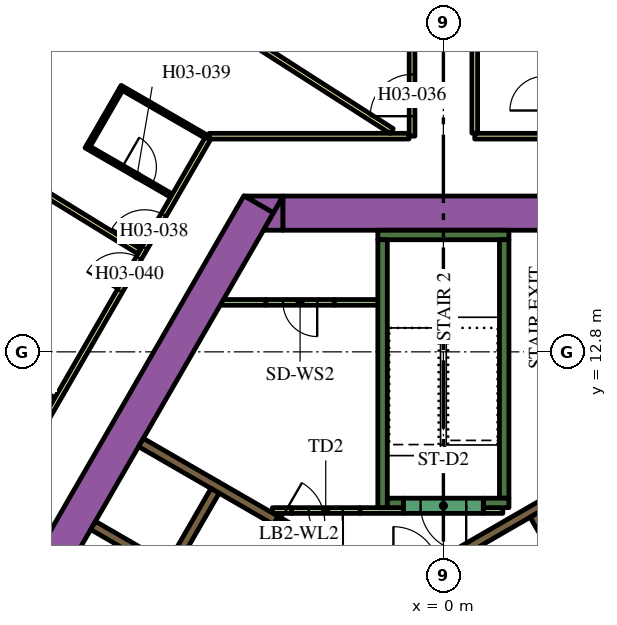
"""IFC4 building model, lengths in metres.
Left out: names, types, materials, properties, quantities, classifications, styles, units other than length and angle.
Written with IfcOpenShell. Run it as: python <this file> out.ifc"""

import sys

from ifc_helpers import new_model, si_unit, direction, frame, frame_2d, origin, place, context, subcontext, project, spatial, polyline, rectangle, outline, extrude, element, fill, save


model = new_model("IFC4")
c1 = context("Model", 3, precision=1e-05, world=origin(), true_north=direction((0.0, 1.0)))
c2 = subcontext(c1, "Body", "Model", "MODEL_VIEW")
j1 = project(units=[si_unit("LENGTHUNIT", "METRE"), si_unit("PLANEANGLEUNIT", "RADIAN")], contexts=[c1])
p1 = place(None, origin())
s1 = spatial("IfcSite", under=j1, at=p1, CompositionType="ELEMENT")
p2 = place(p1, origin())
s2 = spatial("IfcBuilding", under=s1, at=p2, CompositionType="ELEMENT")
p3 = place(p2, frame((0.0, 0.0, 58.8)))
s3 = spatial("IfcBuildingStorey", under=s2, at=p3, CompositionType="ELEMENT", Elevation=58.8)
p4 = place(p3, frame((-14.268, 0.387, 0.0), z_axis=(0.0, 0.0, 1.0), x_axis=(0.499994617707, 0.866028511231, 0.0)))
e1 = element("IfcWall", 1, at=p4, inside=s3, PredefinedType="SOLIDWALL", context=c2, shape_type="SweptSolid", body=[
    extrude(rectangle(XDim=18.817, YDim=0.9, at=frame_2d((9.409, 0.0))), origin(), (0.0, 0.0, 1.0), 3.9),
])
p5 = place(p3, origin())
e2 = element("IfcWall", 2, at=p5, inside=s3, PredefinedType="SOLIDWALL", context=c2, shape_type="SweptSolid", body=[
    extrude(outline(polyline([(-4.215, 16.9), (-4.469, 16.46), (-5.231, 16.9), (-4.215, 16.9)])), origin(), (0.0, 0.0, 1.0), 3.9),
])
p6 = place(p3, frame((-4.224, 16.45, 0.0), z_axis=(0.0, 0.0, 1.0), x_axis=(1.0, 0.0, 0.0)))
e3 = element("IfcWall", 3, at=p6, inside=s3, PredefinedType="SOLIDWALL", context=c2, shape_type="SweptSolid", body=[
    extrude(rectangle(XDim=9.488, YDim=0.9, at=frame_2d((4.744, 0.0))), origin(), (0.0, 0.0, 1.0), 3.9),
])
e4 = element("IfcWall", 4, at=p5, inside=s3, PredefinedType="SOLIDWALL", context=c2, shape_type="SweptSolid", body=[
    extrude(outline(polyline([(-4.734, 16.0), (-4.226, 16.88), (-4.226, 16.0), (-4.734, 16.0)])), origin(), (0.0, 0.0, 1.0), 3.9),
])
p7 = place(p3, frame((-1.725, 15.875, 0.0), z_axis=(0.0, 0.0, 1.0), x_axis=(1.0, 0.0, 0.0)))
e5 = element("IfcWall", 5, at=p7, inside=s3, PredefinedType="SOLIDWALL", context=c2, shape_type="SweptSolid", body=[
    extrude(rectangle(XDim=3.45, YDim=0.25, at=frame_2d((1.725, 0.0))), origin(), (0.0, 0.0, 1.0), 3.9),
])
p8 = place(p3, frame((1.6, 8.95, 0.0), z_axis=(0.0, 0.0, 1.0), x_axis=(0.0, 1.0, 0.0)))
e6 = element("IfcWall", 6, at=p8, inside=s3, PredefinedType="SOLIDWALL", context=c2, shape_type="SweptSolid", body=[
    extrude(rectangle(XDim=6.8, YDim=0.25, at=frame_2d((3.4, 0.0))), origin(), (0.0, 0.0, 1.0), 3.9),
])
p9 = place(p3, frame((1.05, 8.825, 0.0), z_axis=(0.0, 0.0, 1.0), x_axis=(1.0, 0.0, 0.0)))
e7 = element("IfcWall", 7, at=p9, inside=s3, PredefinedType="SOLIDWALL", context=c2, shape_type="SweptSolid", body=[
    extrude(rectangle(XDim=0.675, YDim=0.25, at=frame_2d((0.337, 0.0))), origin(), (0.0, 0.0, 1.0), 3.9),
])
p10 = place(p3, frame((-1.6, 8.7, 0.0), z_axis=(0.0, 0.0, 1.0), x_axis=(0.0, 1.0, 0.0)))
e8 = element("IfcWall", 8, at=p10, inside=s3, PredefinedType="SOLIDWALL", context=c2, shape_type="SweptSolid", body=[
    extrude(rectangle(XDim=7.05, YDim=0.25, at=frame_2d((3.525, 0.0))), origin(), (0.0, 0.0, 1.0), 3.9),
])
p11 = place(p3, frame((-1.475, 8.825, 0.0), z_axis=(0.0, 0.0, 1.0), x_axis=(1.0, 0.0, 0.0)))
e9 = element("IfcWall", 9, at=p11, inside=s3, PredefinedType="SOLIDWALL", context=c2, shape_type="SweptSolid", body=[
    extrude(rectangle(XDim=0.425, YDim=0.25, at=frame_2d((0.212, 0.0))), origin(), (0.0, 0.0, 1.0), 3.9),
])
p12 = place(p3, frame((0.314, 7.456, 0.0), z_axis=(0.0, 0.0, 1.0), x_axis=(0.866013897511, 0.50001992892, 0.0)))
e10 = element("IfcWall", 10, at=p12, inside=s3, PredefinedType="SOLIDWALL", context=c2, shape_type="SweptSolid", body=[
    extrude(rectangle(XDim=3.268, YDim=0.25, at=frame_2d((1.634, 0.0))), origin(), (0.0, 0.0, 1.0), 3.9),
])
e11 = element("IfcWall", 11, at=p5, inside=s3, PredefinedType="SOLIDWALL", context=c2, shape_type="SweptSolid", body=[
    extrude(outline(polyline([(-3.128, 7.481), (-3.259, 7.557), (-3.134, 7.773), (-3.003, 7.698), (-3.128, 7.481)])), origin(), (0.0, 0.0, 1.0), 3.9),
])
p13 = place(p3, frame((-7.314, 7.132, 0.0), z_axis=(0.0, 0.0, 1.0), x_axis=(-0.866008176907, 0.50002983664, 0.0)))
e12 = element("IfcWall", 12, at=p13, inside=s3, PredefinedType="SOLIDWALL", context=c2, shape_type="SweptSolid", body=[
    extrude(rectangle(XDim=2.2, YDim=0.25, at=frame_2d((1.1, 0.0))), origin(), (0.0, 0.0, 1.0), 3.9),
])
p14 = place(p3, frame((-7.959, 10.415, 0.0), z_axis=(0.0, 0.0, 1.0), x_axis=(0.866020958405, -0.500007699544, 0.0)))
e13 = element("IfcWall", 13, at=p14, inside=s3, PredefinedType="SOLIDWALL", context=c2, shape_type="SweptSolid", body=[
    extrude(rectangle(XDim=4.1, YDim=0.25, at=frame_2d((2.05, 0.0))), origin(), (0.0, 0.0, 1.0), 3.9),
])
p15 = place(p3, frame((-3.997, 8.625, 0.0), z_axis=(0.0, 0.0, 1.0), x_axis=(-1.0, 0.0, 0.0)))
e14 = element("IfcWall", 14, at=p15, inside=s3, PredefinedType="PARTITIONING", context=c2, shape_type="SweptSolid", body=[
    extrude(rectangle(XDim=0.502, YDim=0.15, at=frame_2d((0.251, 0.0))), origin(), (0.0, 0.0, 1.0), 2.75),
])
p16 = place(p3, frame((-5.851, 14.102, 0.0), z_axis=(0.0, 0.0, 1.0), x_axis=(1.0, 0.0, 0.0)))
e15 = element("IfcWall", 15, at=p16, inside=s3, PredefinedType="PARTITIONING", context=c2, shape_type="SweptSolid", body=[
    extrude(rectangle(XDim=1.18, YDim=0.15, at=frame_2d((0.59, 0.0))), origin(), (0.0, 0.0, 1.0), 2.75),
])
p17 = place(p3, frame((-2.196, 8.625, 0.0), z_axis=(0.0, 0.0, 1.0), x_axis=(1.0, 0.0, 0.0)))
e16 = element("IfcWall", 16, at=p17, inside=s3, PredefinedType="PARTITIONING", context=c2, shape_type="SweptSolid", body=[
    extrude(rectangle(XDim=1.146, YDim=0.15, at=frame_2d((0.573, 0.0))), origin(), (0.0, 0.0, 1.0), 2.75),
])
p18 = place(p3, frame((1.05, 8.625, 0.0), z_axis=(0.0, 0.0, 1.0), x_axis=(1.0, 0.0, 0.0)))
e17 = element("IfcWall", 17, at=p18, inside=s3, PredefinedType="PARTITIONING", context=c2, shape_type="SweptSolid", body=[
    extrude(rectangle(XDim=0.514, YDim=0.15, at=frame_2d((0.257, 0.0))), origin(), (0.0, 0.0, 1.0), 2.75),
])
p19 = place(p3, frame((-2.871, 14.102, 0.0), z_axis=(0.0, 0.0, 1.0), x_axis=(1.0, 0.0, 0.0)))
e18 = element("IfcWall", 18, at=p19, inside=s3, PredefinedType="PARTITIONING", context=c2, shape_type="SweptSolid", body=[
    extrude(rectangle(XDim=1.196, YDim=0.15, at=frame_2d((0.598, 0.0))), origin(), (0.0, 0.0, 1.0), 2.75),
])
p20 = place(p3, frame((8.565, -2.185, 0.0), z_axis=(0.0, 0.0, 1.0), x_axis=(-0.499997954832, 0.866026584559, 0.0)))
e19 = element("IfcWall", 19, at=p20, inside=s3, PredefinedType="SOLIDWALL", context=c2, shape_type="SweptSolid", body=[
    extrude(rectangle(XDim=12.35, YDim=0.25, at=frame_2d((6.175, 0.0))), origin(), (0.0, 0.0, 1.0), 3.9),
])
p21 = place(p20, frame((5.725, 0.0, 0.0)))
e20 = element("IfcOpeningElement", 20, at=p21, cuts=e19, PredefinedType="OPENING", context=c2, shape_type="SweptSolid", body=[
    extrude(rectangle(XDim=0.9, YDim=2.1, at=frame_2d((0.45, 1.05))), frame((0.0, 0.135, 0.0), z_axis=(0.0, -1.0, 0.0), x_axis=(1.0, 0.0, 0.0)), (0.0, 0.0, 1.0), 0.27),
])
p22 = place(p3, frame((-6.008, 9.144, 0.0), z_axis=(0.0, 0.0, 1.0), x_axis=(-0.500006956611, -0.866021387346, 0.0)))
e21 = element("IfcWall", 21, at=p22, inside=s3, PredefinedType="SOLIDWALL", context=c2, shape_type="SweptSolid", body=[
    extrude(rectangle(XDim=9.83, YDim=0.25, at=frame_2d((4.915, 0.0))), origin(), (0.0, 0.0, 1.0), 3.9),
])
p23 = place(p22, frame((6.985, 0.0, 0.0)))
e22 = element("IfcOpeningElement", 22, at=p23, cuts=e21, PredefinedType="OPENING", context=c2, shape_type="SweptSolid", body=[
    extrude(rectangle(XDim=0.9, YDim=2.1, at=frame_2d((0.45, 1.05))), frame((0.0, 0.135, 0.0), z_axis=(0.0, -1.0, 0.0), x_axis=(1.0, 0.0, 0.0)), (0.0, 0.0, 1.0), 0.27),
])
p24 = place(p3, frame((1.05, 8.75, 0.0), z_axis=(0.0, 0.0, 1.0), x_axis=(-1.0, 0.0, 0.0)))
e23 = element("IfcWall", 23, at=p24, inside=s3, PredefinedType="SOLIDWALL", context=c2, shape_type="SweptSolid", body=[
    extrude(rectangle(XDim=2.1, YDim=0.4, at=frame_2d((1.05, 0.0))), origin(), (0.0, 0.0, 1.0), 3.9),
])
p25 = place(p24, frame((0.45, 0.0, 0.0)))
e24 = element("IfcOpeningElement", 24, at=p25, cuts=e23, PredefinedType="OPENING", context=c2, shape_type="SweptSolid", body=[
    extrude(rectangle(XDim=1.2, YDim=2.1, at=frame_2d((0.6, 1.05))), frame((0.0, 0.21, 0.0), z_axis=(0.0, -1.0, 0.0), x_axis=(1.0, 0.0, 0.0)), (0.0, 0.0, 1.0), 0.42),
])
p26 = place(p3, frame((-2.196, 8.625, 0.0), z_axis=(0.0, 0.0, 1.0), x_axis=(-1.0, 0.0, 0.0)))
e25 = element("IfcWall", 25, at=p26, inside=s3, PredefinedType="PARTITIONING", context=c2, shape_type="SweptSolid", body=[
    extrude(rectangle(XDim=1.8, YDim=0.15, at=frame_2d((0.9, 0.0))), origin(), (0.0, 0.0, 1.0), 2.75),
])
p27 = place(p26, frame((0.45, 0.0, 0.0)))
e26 = element("IfcOpeningElement", 26, at=p27, cuts=e25, PredefinedType="OPENING", context=c2, shape_type="SweptSolid", body=[
    extrude(rectangle(XDim=0.9, YDim=2.1, at=frame_2d((0.45, 1.05))), frame((0.0, 0.085, 0.0), z_axis=(0.0, -1.0, 0.0), x_axis=(1.0, 0.0, 0.0)), (0.0, 0.0, 1.0), 0.17),
])
p28 = place(p3, frame((-4.409, 8.365, 0.0), z_axis=(0.0, 0.0, 1.0), x_axis=(0.866034573852, -0.49998411664, 0.0)))
e27 = element("IfcWall", 27, at=p28, inside=s3, PredefinedType="SOLIDWALL", context=c2, shape_type="SweptSolid", body=[
    extrude(rectangle(XDim=1.4, YDim=0.25, at=frame_2d((0.7, 0.0))), origin(), (0.0, 0.0, 1.0), 3.9),
])
p29 = place(p28, frame((0.1, 0.0, 0.0)))
e28 = element("IfcOpeningElement", 28, at=p29, cuts=e27, PredefinedType="OPENING", context=c2, shape_type="SweptSolid", body=[
    extrude(rectangle(XDim=1.2, YDim=2.1, at=frame_2d((0.6, 1.05))), frame((0.0, 0.135, 0.0), z_axis=(0.0, -1.0, 0.0), x_axis=(1.0, 0.0, 0.0)), (0.0, 0.0, 1.0), 0.27),
])
p30 = place(p3, frame((-2.871, 14.102, 0.0), z_axis=(0.0, 0.0, 1.0), x_axis=(-1.0, 0.0, 0.0)))
e29 = element("IfcWall", 29, at=p30, inside=s3, PredefinedType="PARTITIONING", context=c2, shape_type="SweptSolid", body=[
    extrude(rectangle(XDim=1.8, YDim=0.15, at=frame_2d((0.9, 0.0))), origin(), (0.0, 0.0, 1.0), 2.75),
])
p31 = place(p30, frame((0.45, 0.0, 0.0)))
e30 = element("IfcOpeningElement", 30, at=p31, cuts=e29, PredefinedType="OPENING", context=c2, shape_type="SweptSolid", body=[
    extrude(rectangle(XDim=0.9, YDim=2.1, at=frame_2d((0.45, 1.05))), frame((0.0, 0.085, 0.0), z_axis=(0.0, -1.0, 0.0), x_axis=(1.0, 0.0, 0.0)), (0.0, 0.0, 1.0), 0.17),
])
p32 = place(p3, frame((0.825, 18.475, 0.0), z_axis=(0.0, 0.0, 1.0), x_axis=(1.0, 0.0, 0.0)))
e31 = element("IfcWall", 31, at=p32, inside=s3, PredefinedType="PARTITIONING", context=c2, shape_type="SweptSolid", body=[
    extrude(rectangle(XDim=5.268, YDim=0.15, at=frame_2d((2.634, 0.0))), origin(), (0.0, 0.0, 1.0), 2.75),
])
p33 = place(p32, frame((4.088, 0.0, 0.0)))
e32 = element("IfcOpeningElement", 32, at=p33, cuts=e31, PredefinedType="OPENING", context=c2, shape_type="SweptSolid", body=[
    extrude(rectangle(XDim=1.0, YDim=2.1, at=frame_2d((0.5, 1.05))), frame((0.0, 0.085, 0.0), z_axis=(0.0, -1.0, 0.0), x_axis=(1.0, 0.0, 0.0)), (0.0, 0.0, 1.0), 0.17),
])
p34 = place(p3, frame((0.825, 34.699, 0.0), z_axis=(0.0, 0.0, 1.0), x_axis=(0.0, -1.0, 0.0)))
e33 = element("IfcWall", 33, at=p34, inside=s3, PredefinedType="PARTITIONING", context=c2, shape_type="SweptSolid", body=[
    extrude(rectangle(XDim=16.144, YDim=0.15, at=frame_2d((8.072, 0.0))), origin(), (0.0, 0.0, 1.0), 2.75),
])
p35 = place(p34, frame((10.329, 0.0, 0.0)))
e34 = element("IfcOpeningElement", 34, at=p35, cuts=e33, PredefinedType="OPENING", context=c2, shape_type="SweptSolid", body=[
    extrude(rectangle(XDim=0.9, YDim=2.1, at=frame_2d((0.45, 1.05))), frame((0.0, 0.085, 0.0), z_axis=(0.0, -1.0, 0.0), x_axis=(1.0, 0.0, 0.0)), (0.0, 0.0, 1.0), 0.17),
])
p36 = place(p34, frame((7.275, 0.0, 0.0)))
e35 = element("IfcOpeningElement", 35, at=p36, cuts=e33, PredefinedType="OPENING", context=c2, shape_type="SweptSolid", body=[
    extrude(rectangle(XDim=1.0, YDim=2.1, at=frame_2d((0.5, 1.05))), frame((0.0, 0.085, 0.0), z_axis=(0.0, -1.0, 0.0), x_axis=(1.0, 0.0, 0.0)), (0.0, 0.0, 1.0), 0.17),
])
p37 = place(p3, frame((-0.825, 18.475, 0.0), z_axis=(0.0, 0.0, 1.0), x_axis=(0.0, 1.0, 0.0)))
e36 = element("IfcWall", 36, at=p37, inside=s3, PredefinedType="PARTITIONING", context=c2, shape_type="SweptSolid", body=[
    extrude(rectangle(XDim=16.224, YDim=0.15, at=frame_2d((8.112, 0.0))), origin(), (0.0, 0.0, 1.0), 2.75),
])
p38 = place(p37, frame((7.949, 0.0, 0.0)))
e37 = element("IfcOpeningElement", 37, at=p38, cuts=e36, PredefinedType="OPENING", context=c2, shape_type="SweptSolid", body=[
    extrude(rectangle(XDim=1.0, YDim=2.1, at=frame_2d((0.5, 1.05))), frame((0.0, 0.085, 0.0), z_axis=(0.0, -1.0, 0.0), x_axis=(1.0, 0.0, 0.0)), (0.0, 0.0, 1.0), 0.17),
])
p39 = place(p37, frame((0.526, 0.0, 0.0)))
e38 = element("IfcOpeningElement", 38, at=p39, cuts=e36, PredefinedType="OPENING", context=c2, shape_type="SweptSolid", body=[
    extrude(rectangle(XDim=1.1, YDim=2.1, at=frame_2d((0.55, 1.05))), frame((0.0, 0.085, 0.0), z_axis=(0.0, -1.0, 0.0), x_axis=(1.0, 0.0, 0.0)), (0.0, 0.0, 1.0), 0.17),
])
p40 = place(p3, frame((-6.163, 18.475, 0.0), z_axis=(0.0, 0.0, 1.0), x_axis=(1.0, 0.0, 0.0)))
e39 = element("IfcWall", 39, at=p40, inside=s3, PredefinedType="PARTITIONING", context=c2, shape_type="SweptSolid", body=[
    extrude(rectangle(XDim=5.258, YDim=0.15, at=frame_2d((2.629, 0.0))), origin(), (0.0, 0.0, 1.0), 2.75),
])
p41 = place(p3, frame((-19.081, -3.9, 0.0), z_axis=(0.0, 0.0, 1.0), x_axis=(0.499998313975, 0.866026377209, 0.0)))
e40 = element("IfcWall", 40, at=p41, inside=s3, PredefinedType="PARTITIONING", context=c2, shape_type="SweptSolid", body=[
    extrude(rectangle(XDim=25.766, YDim=0.15, at=frame_2d((12.883, 0.0))), origin(), (0.0, 0.0, 1.0), 2.75),
])
p42 = place(p41, frame((22.445, 0.0, 0.0)))
e41 = element("IfcOpeningElement", 41, at=p42, cuts=e40, PredefinedType="OPENING", context=c2, shape_type="SweptSolid", body=[
    extrude(rectangle(XDim=1.0, YDim=2.1, at=frame_2d((0.5, 1.05))), frame((0.0, 0.085, 0.0), z_axis=(0.0, -1.0, 0.0), x_axis=(1.0, 0.0, 0.0)), (0.0, 0.0, 1.0), 0.17),
])
p43 = place(p41, frame((21.138, 0.0, 0.0)))
e42 = element("IfcOpeningElement", 42, at=p43, cuts=e40, PredefinedType="OPENING", context=c2, shape_type="SweptSolid", body=[
    extrude(rectangle(XDim=1.0, YDim=2.1, at=frame_2d((0.5, 1.05))), frame((0.0, 0.085, 0.0), z_axis=(0.0, -1.0, 0.0), x_axis=(1.0, 0.0, 0.0)), (0.0, 0.0, 1.0), 0.17),
])
p44 = place(p41, frame((14.066, 0.0, 0.0)))
e43 = element("IfcOpeningElement", 43, at=p44, cuts=e40, PredefinedType="OPENING", context=c2, shape_type="SweptSolid", body=[
    extrude(rectangle(XDim=0.9, YDim=2.1, at=frame_2d((0.45, 1.05))), frame((0.0, 0.085, 0.0), z_axis=(0.0, -1.0, 0.0), x_axis=(1.0, 0.0, 0.0)), (0.0, 0.0, 1.0), 0.17),
])
p45 = place(p41, frame((11.693, 0.0, 0.0)))
e44 = element("IfcOpeningElement", 44, at=p45, cuts=e40, PredefinedType="OPENING", context=c2, shape_type="SweptSolid", body=[
    extrude(rectangle(XDim=1.0, YDim=2.1, at=frame_2d((0.5, 1.05))), frame((0.0, 0.085, 0.0), z_axis=(0.0, -1.0, 0.0), x_axis=(1.0, 0.0, 0.0)), (0.0, 0.0, 1.0), 0.17),
])
p46 = place(p3, frame((-14.558, 19.475, 0.0), z_axis=(0.0, 0.0, 1.0), x_axis=(0.851829455142, -0.523819223925, 0.0)))
e45 = element("IfcWall", 45, at=p46, inside=s3, PredefinedType="PARTITIONING", context=c2, shape_type="SweptSolid", body=[
    extrude(rectangle(XDim=7.688, YDim=0.15, at=frame_2d((3.844, 0.0))), origin(), (0.0, 0.0, 1.0), 2.75),
])
p47 = place(p3, frame((-11.16, 24.888, 0.0), z_axis=(0.0, 0.0, 1.0), x_axis=(0.84199813156, -0.539480441211, 0.0)))
e46 = element("IfcWall", 46, at=p47, inside=s3, PredefinedType="PARTITIONING", context=c2, shape_type="SweptSolid", body=[
    extrude(rectangle(XDim=11.638, YDim=0.15, at=frame_2d((5.819, 0.0))), origin(), (0.0, 0.0, 1.0), 2.75),
])
p48 = place(p3, frame((-9.405, 18.21, 0.0), z_axis=(0.0, 0.0, 1.0), x_axis=(0.865997922154, -0.500047596559, 0.0)))
e47 = element("IfcWall", 47, at=p48, inside=s3, PredefinedType="PARTITIONING", context=c2, shape_type="SweptSolid", body=[
    extrude(rectangle(XDim=2.6, YDim=0.1, at=frame_2d((1.3, 0.0))), origin(), (0.0, 0.0, 1.0), 2.75),
])
p49 = place(p48, frame((1.1, 0.0, 0.0)))
e48 = element("IfcOpeningElement", 48, at=p49, cuts=e47, PredefinedType="OPENING", context=c2, shape_type="SweptSolid", body=[
    extrude(rectangle(XDim=0.9, YDim=2.1, at=frame_2d((0.45, 1.05))), frame((0.0, 0.06, 0.0), z_axis=(0.0, -1.0, 0.0), x_axis=(1.0, 0.0, 0.0)), (0.0, 0.0, 1.0), 0.12),
])
p50 = place(p3, frame((-9.336, 18.229, 0.0), z_axis=(0.0, 0.0, 1.0), x_axis=(0.499954529098, 0.86605165483, 0.0)))
e49 = element("IfcWall", 49, at=p50, inside=s3, PredefinedType="PARTITIONING", context=c2, shape_type="SweptSolid", body=[
    extrude(rectangle(XDim=1.7, YDim=0.1, at=frame_2d((0.85, 0.0))), origin(), (0.0, 0.0, 1.0), 2.75),
])
p51 = place(p3, frame((-6.253, 18.469, 0.0), z_axis=(0.0, 0.0, 1.0), x_axis=(-0.866021400173, 0.500006934395, 0.0)))
e50 = element("IfcWall", 50, at=p51, inside=s3, PredefinedType="PARTITIONING", context=c2, shape_type="SweptSolid", body=[
    extrude(rectangle(XDim=2.6, YDim=0.1, at=frame_2d((1.3, 0.0))), origin(), (0.0, 0.0, 1.0), 2.75),
])
p52 = place(p3, frame((-10.249, 11.549, 0.0), z_axis=(0.0, 0.0, 1.0), x_axis=(-0.866021400173, 0.500006934395, 0.0)))
e51 = element("IfcWall", 51, at=p52, inside=s3, PredefinedType="PARTITIONING", context=c2, shape_type="SweptSolid", body=[
    extrude(rectangle(XDim=2.6, YDim=0.1, at=frame_2d((1.3, 0.0))), origin(), (0.0, 0.0, 1.0), 2.75),
])
p53 = place(p52, frame((0.6, 0.0, 0.0)))
e52 = element("IfcOpeningElement", 52, at=p53, cuts=e51, PredefinedType="OPENING", context=c2, shape_type="SweptSolid", body=[
    extrude(rectangle(XDim=0.9, YDim=2.1, at=frame_2d((0.45, 1.05))), frame((0.0, 0.06, 0.0), z_axis=(0.0, -1.0, 0.0), x_axis=(1.0, 0.0, 0.0)), (0.0, 0.0, 1.0), 0.12),
])
p54 = place(p25, origin())
e53 = element("IfcDoor", 53, at=p54, inside=s3, OperationType="SINGLE_SWING_LEFT", PredefinedType="DOOR", context=c2, shape_type="SweptSolid", body=[
    extrude(rectangle(XDim=1.2, YDim=2.1, at=frame_2d((0.6, 1.05))), frame((0.0, 0.025, 0.0), z_axis=(0.0, -1.0, 0.0), x_axis=(1.0, 0.0, 0.0)), (0.0, 0.0, 1.0), 0.05),
])
fill(e24, e53)
p55 = place(p27, origin())
e54 = element("IfcDoor", 54, at=p55, inside=s3, OperationType="SINGLE_SWING_LEFT", PredefinedType="DOOR", context=c2, shape_type="SweptSolid", body=[
    extrude(rectangle(XDim=0.9, YDim=2.1, at=frame_2d((0.45, 1.05))), frame((0.0, 0.025, 0.0), z_axis=(0.0, -1.0, 0.0), x_axis=(1.0, 0.0, 0.0)), (0.0, 0.0, 1.0), 0.05),
])
fill(e26, e54)
p56 = place(p29, origin())
e55 = element("IfcDoor", 55, at=p56, inside=s3, OperationType="SINGLE_SWING_LEFT", PredefinedType="DOOR", context=c2, shape_type="SweptSolid", body=[
    extrude(rectangle(XDim=1.2, YDim=2.1, at=frame_2d((0.6, 1.05))), frame((0.0, 0.025, 0.0), z_axis=(0.0, -1.0, 0.0), x_axis=(1.0, 0.0, 0.0)), (0.0, 0.0, 1.0), 0.05),
])
fill(e28, e55)
p57 = place(p31, origin())
e56 = element("IfcDoor", 56, at=p57, inside=s3, OperationType="SINGLE_SWING_LEFT", PredefinedType="DOOR", context=c2, shape_type="SweptSolid", body=[
    extrude(rectangle(XDim=0.9, YDim=2.1, at=frame_2d((0.45, 1.05))), frame((0.0, 0.025, 0.0), z_axis=(0.0, -1.0, 0.0), x_axis=(1.0, 0.0, 0.0)), (0.0, 0.0, 1.0), 0.05),
])
fill(e30, e56)
p58 = place(p39, origin())
e57 = element("IfcDoor", 57, at=p58, inside=s3, OperationType="SINGLE_SWING_LEFT", PredefinedType="DOOR", context=c2, shape_type="SweptSolid", body=[
    extrude(rectangle(XDim=1.1, YDim=2.1, at=frame_2d((0.55, 1.05))), frame((0.0, 0.025, 0.0), z_axis=(0.0, -1.0, 0.0), x_axis=(1.0, 0.0, 0.0)), (0.0, 0.0, 1.0), 0.05),
])
fill(e38, e57)
p59 = place(p42, origin())
e58 = element("IfcDoor", 58, at=p59, inside=s3, OperationType="SINGLE_SWING_LEFT", PredefinedType="DOOR", context=c2, shape_type="SweptSolid", body=[
    extrude(rectangle(XDim=1.0, YDim=2.1, at=frame_2d((0.5, 1.05))), frame((0.0, 0.025, 0.0), z_axis=(0.0, -1.0, 0.0), x_axis=(1.0, 0.0, 0.0)), (0.0, 0.0, 1.0), 0.05),
])
fill(e41, e58)
p60 = place(p49, origin())
e59 = element("IfcDoor", 59, at=p60, inside=s3, OperationType="SINGLE_SWING_LEFT", PredefinedType="DOOR", context=c2, shape_type="SweptSolid", body=[
    extrude(rectangle(XDim=0.9, YDim=2.1, at=frame_2d((0.45, 1.05))), frame((0.0, 0.025, 0.0), z_axis=(0.0, -1.0, 0.0), x_axis=(1.0, 0.0, 0.0)), (0.0, 0.0, 1.0), 0.05),
])
fill(e48, e59)
p61 = place(p43, origin())
e60 = element("IfcDoor", 60, at=p61, inside=s3, OperationType="SINGLE_SWING_RIGHT", PredefinedType="DOOR", context=c2, shape_type="SweptSolid", body=[
    extrude(rectangle(XDim=1.0, YDim=2.1, at=frame_2d((0.5, 1.05))), frame((0.0, 0.025, 0.0), z_axis=(0.0, -1.0, 0.0), x_axis=(1.0, 0.0, 0.0)), (0.0, 0.0, 1.0), 0.05),
])
fill(e42, e60)
save(model, sys.argv[1])
